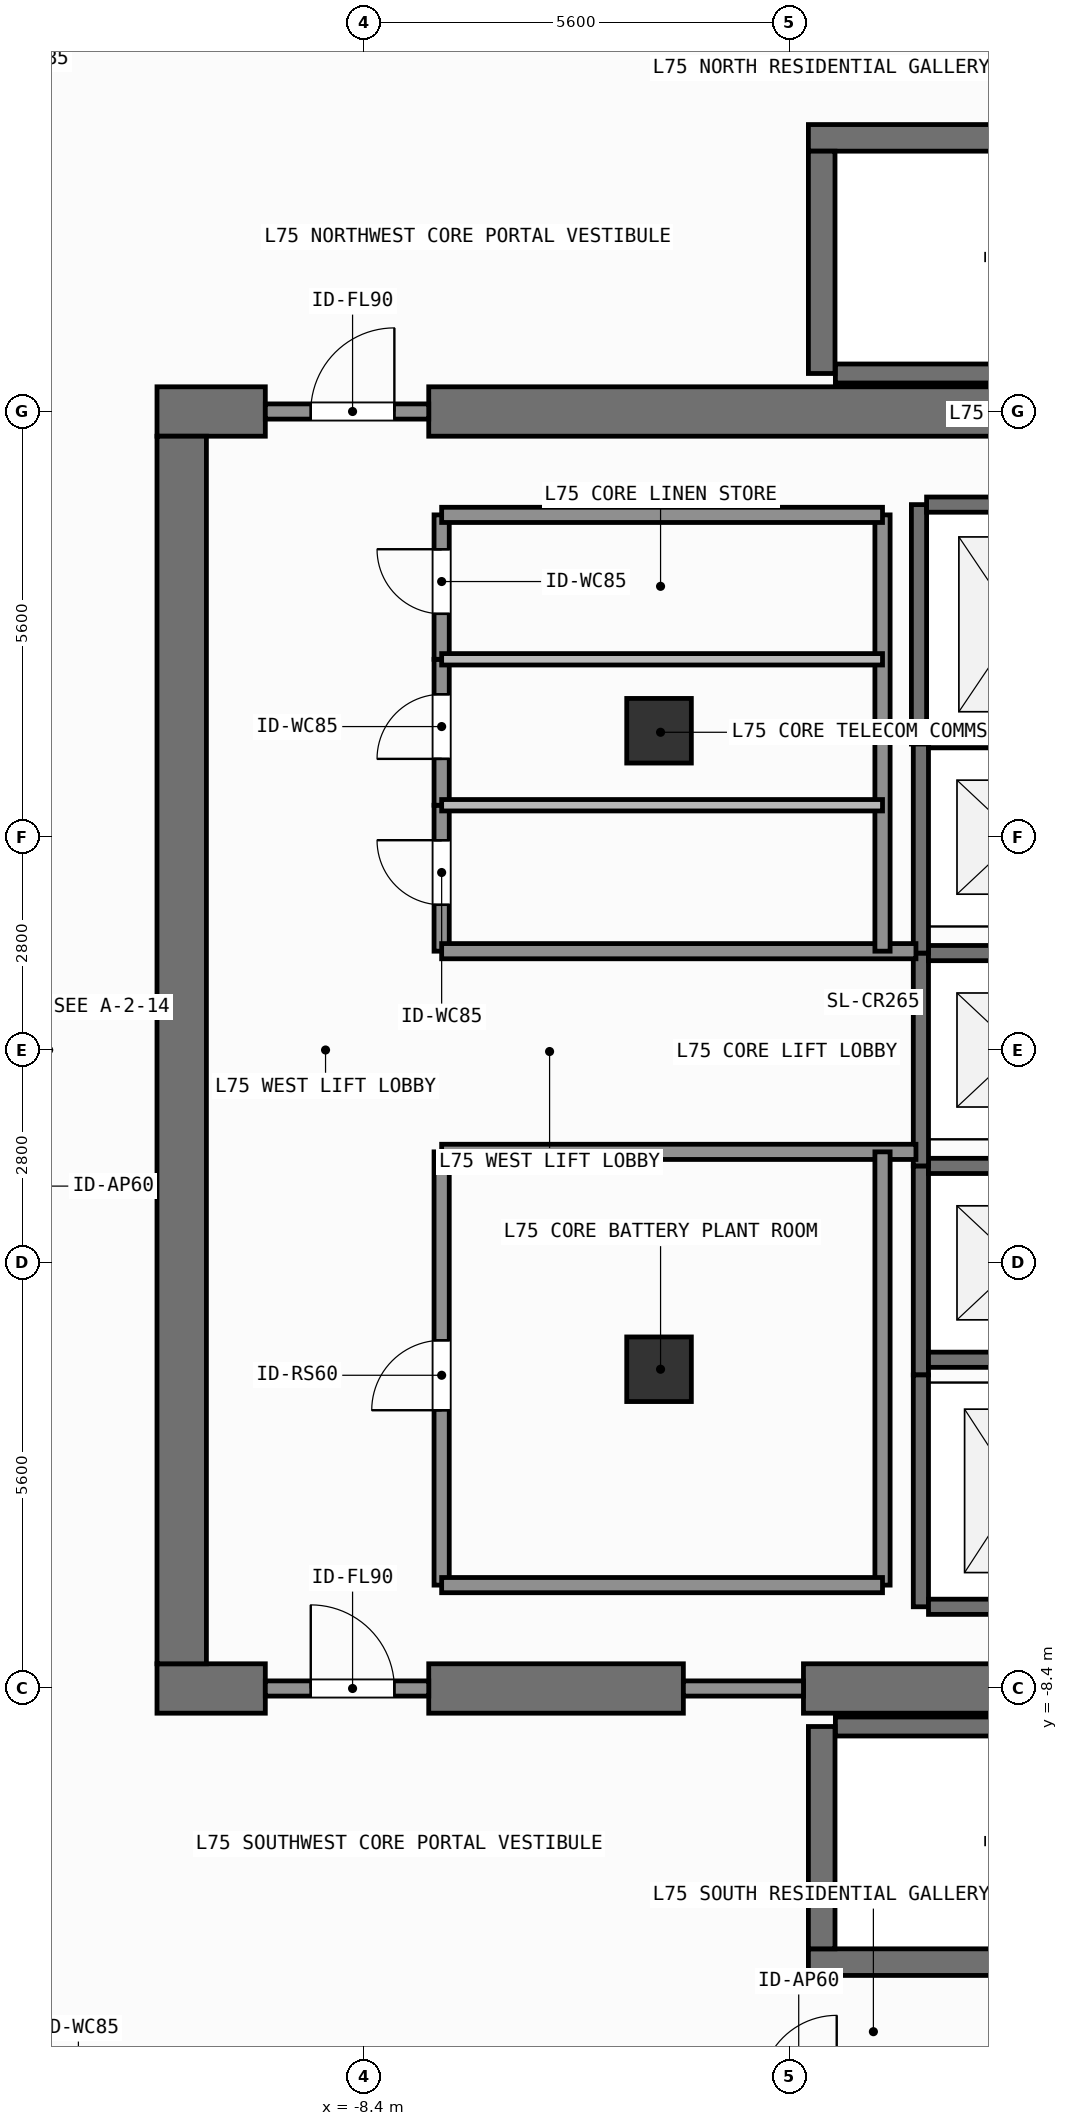
"""IFC4 building model, lengths in metres.
Left out: names, types, materials, properties, quantities, classifications, styles, units other than length and angle.
Written with IfcOpenShell. Run it as: python <this file> out.ifc"""

import sys

from ifc_helpers import new_model, si_unit, direction, frame, frame_2d, origin, origin_2d, place, context, subcontext, project, spatial, rectangle, extrude, element, fill, save


model = new_model("IFC4")
c1 = context("Model", 3, precision=1e-05, world=origin(), true_north=direction((0.0, 1.0)))
c2 = subcontext(c1, "Body", "Model", "MODEL_VIEW")
j1 = project(units=[si_unit("LENGTHUNIT", "METRE"), si_unit("PLANEANGLEUNIT", "RADIAN")], contexts=[c1])
p1 = place(None, origin())
s1 = spatial("IfcSite", under=j1, at=p1, CompositionType="ELEMENT")
p2 = place(p1, origin())
s2 = spatial("IfcBuilding", under=s1, at=p2, CompositionType="ELEMENT")
p3 = place(p2, frame((0.0, 0.0, 305.4)))
s3 = spatial("IfcBuildingStorey", under=s2, at=p3, CompositionType="ELEMENT", Elevation=305.4)
p4 = place(p3, frame((-11.125, -8.4, 0.0), z_axis=(0.0, 0.0, 1.0), x_axis=(1.0, 0.0, 0.0)))
e1 = element("IfcWall", 1, at=p4, inside=s3, PredefinedType="SHEAR", context=c2, shape_type="SweptSolid", body=[
    extrude(rectangle(XDim=1.425, YDim=0.65, at=frame_2d((0.712, 0.0))), origin(), (0.0, 0.0, 1.0), 3.9),
])
p5 = place(p3, frame((-7.55, -8.4, 0.0), z_axis=(0.0, 0.0, 1.0), x_axis=(1.0, 0.0, 0.0)))
e2 = element("IfcWall", 2, at=p5, inside=s3, PredefinedType="SHEAR", context=c2, shape_type="SweptSolid", body=[
    extrude(rectangle(XDim=3.35, YDim=0.65, at=frame_2d((1.675, 0.0))), origin(), (0.0, 0.0, 1.0), 3.9),
])
p6 = place(p3, frame((-2.62, -8.4, 0.0), z_axis=(0.0, 0.0, 1.0), x_axis=(1.0, 0.0, 0.0)))
e3 = element("IfcWall", 3, at=p6, inside=s3, PredefinedType="SHEAR", context=c2, shape_type="SweptSolid", body=[
    extrude(rectangle(XDim=7.27, YDim=0.65, at=frame_2d((3.635, 0.0))), origin(), (0.0, 0.0, 1.0), 3.9),
])
p7 = place(p3, frame((-11.125, 8.4, 0.0), z_axis=(0.0, 0.0, 1.0), x_axis=(1.0, 0.0, 0.0)))
e4 = element("IfcWall", 4, at=p7, inside=s3, PredefinedType="SHEAR", context=c2, shape_type="SweptSolid", body=[
    extrude(rectangle(XDim=1.425, YDim=0.65, at=frame_2d((0.712, 0.0))), origin(), (0.0, 0.0, 1.0), 3.9),
])
p8 = place(p3, frame((-7.55, 8.4, 0.0), z_axis=(0.0, 0.0, 1.0), x_axis=(1.0, 0.0, 0.0)))
e5 = element("IfcWall", 5, at=p8, inside=s3, PredefinedType="SHEAR", context=c2, shape_type="SweptSolid", body=[
    extrude(rectangle(XDim=16.275, YDim=0.65, at=frame_2d((8.138, 0.0))), origin(), (0.0, 0.0, 1.0), 3.9),
])
p9 = place(p3, frame((-10.8, -8.075, 0.0), z_axis=(0.0, 0.0, 1.0), x_axis=(0.0, 1.0, 0.0)))
e6 = element("IfcWall", 6, at=p9, inside=s3, PredefinedType="SHEAR", context=c2, shape_type="SweptSolid", body=[
    extrude(rectangle(XDim=16.15, YDim=0.65, at=frame_2d((8.075, 0.0))), origin(), (0.0, 0.0, 1.0), 3.9),
])
p10 = place(p3, frame((-2.555, -12.0, 0.0), z_axis=(0.0, 0.0, 1.0), x_axis=(1.0, 0.0, 0.0)))
e7 = element("IfcWall", 7, at=p10, inside=s3, PredefinedType="SHEAR", context=c2, shape_type="SweptSolid", body=[
    extrude(rectangle(XDim=7.31, YDim=0.35, at=frame_2d((3.655, 0.0))), origin(), (0.0, 0.0, 1.0), 3.9),
])
p11 = place(p3, frame((-2.2, -8.9, 0.0), z_axis=(0.0, 0.0, 1.0), x_axis=(1.0, 0.0, 0.0)))
e8 = element("IfcWall", 8, at=p11, inside=s3, PredefinedType="SHEAR", context=c2, shape_type="SweptSolid", body=[
    extrude(rectangle(XDim=6.6, YDim=0.25, at=frame_2d((3.3, 0.0))), origin(), (0.0, 0.0, 1.0), 3.9),
])
p12 = place(p3, frame((-2.38, -11.825, 0.0), z_axis=(0.0, 0.0, 1.0), x_axis=(0.0, 1.0, 0.0)))
e9 = element("IfcWall", 9, at=p12, inside=s3, PredefinedType="SHEAR", context=c2, shape_type="SweptSolid", body=[
    extrude(rectangle(XDim=2.925, YDim=0.35, at=frame_2d((1.462, 0.0))), origin(), (0.0, 0.0, 1.0), 3.9),
])
p13 = place(p3, frame((-2.555, 12.0, 0.0), z_axis=(0.0, 0.0, 1.0), x_axis=(1.0, 0.0, 0.0)))
e10 = element("IfcWall", 10, at=p13, inside=s3, PredefinedType="SHEAR", context=c2, shape_type="SweptSolid", body=[
    extrude(rectangle(XDim=7.31, YDim=0.35, at=frame_2d((3.655, 0.0))), origin(), (0.0, 0.0, 1.0), 3.9),
])
p14 = place(p3, frame((-2.2, 8.9, 0.0), z_axis=(0.0, 0.0, 1.0), x_axis=(1.0, 0.0, 0.0)))
e11 = element("IfcWall", 11, at=p14, inside=s3, PredefinedType="SHEAR", context=c2, shape_type="SweptSolid", body=[
    extrude(rectangle(XDim=6.6, YDim=0.25, at=frame_2d((3.3, 0.0))), origin(), (0.0, 0.0, 1.0), 3.9),
])
p15 = place(p3, frame((-2.38, 8.9, 0.0), z_axis=(0.0, 0.0, 1.0), x_axis=(0.0, 1.0, 0.0)))
e12 = element("IfcWall", 12, at=p15, inside=s3, PredefinedType="SHEAR", context=c2, shape_type="SweptSolid", body=[
    extrude(rectangle(XDim=2.925, YDim=0.35, at=frame_2d((1.462, 0.0))), origin(), (0.0, 0.0, 1.0), 3.9),
])
for number, where, z_axis, x_axis in (
    (13, (-4.52, -4.2, 0.0), (0.0, 0.0, 1.0), (1.0, 0.0, 0.0)),
    (14, (-4.52, 4.2, 0.0), (0.0, 0.0, 1.0), (1.0, 0.0, 0.0)),
):
    element("IfcColumn", number, at=place(p3, frame(where, z_axis=z_axis, x_axis=x_axis)), inside=s3, PredefinedType="COLUMN", context=c2, shape_type="SweptSolid", body=[
        extrude(rectangle(XDim=0.85, YDim=0.85, at=origin_2d()), origin(), (0.0, 0.0, 1.0), 3.9),
    ])
p16 = place(p3, frame((-1.075, -4.275, 0.0), z_axis=(0.0, 0.0, 1.0), x_axis=(0.0, 1.0, 0.0)))
e15 = element("IfcWall", 15, at=p16, inside=s3, PredefinedType="SHEAR", context=c2, shape_type="SweptSolid", body=[
    extrude(rectangle(XDim=2.75, YDim=0.2, at=frame_2d((1.375, 0.0))), origin(), (0.0, 0.0, 1.0), 3.68),
])
for number, where, z_axis, x_axis in (
    (16, (-0.975, -4.075, 0.0), (0.0, 0.0, 1.0), (1.0, 0.0, 0.0)),
    (17, (-0.975, -1.525, 0.0), (0.0, 0.0, 1.0), (1.0, 0.0, 0.0)),
):
    element("IfcWall", number, at=place(p3, frame(where, z_axis=z_axis, x_axis=x_axis)), inside=s3, PredefinedType="SHEAR", context=c2, shape_type="SweptSolid", body=[
        extrude(rectangle(XDim=2.35, YDim=0.2, at=frame_2d((1.175, 0.0))), origin(), (0.0, 0.0, 1.0), 3.68),
    ])
p17 = place(p3, frame((-1.075, -1.525, 0.0), z_axis=(0.0, 0.0, 1.0), x_axis=(0.0, 1.0, 0.0)))
e18 = element("IfcWall", 18, at=p17, inside=s3, PredefinedType="SHEAR", context=c2, shape_type="SweptSolid", body=[
    extrude(rectangle(XDim=2.8, YDim=0.2, at=frame_2d((1.4, 0.0))), origin(), (0.0, 0.0, 1.0), 3.68),
])
p18 = place(p3, frame((-0.975, 1.275, 0.0), z_axis=(0.0, 0.0, 1.0), x_axis=(1.0, 0.0, 0.0)))
e19 = element("IfcWall", 19, at=p18, inside=s3, PredefinedType="SHEAR", context=c2, shape_type="SweptSolid", body=[
    extrude(rectangle(XDim=2.35, YDim=0.2, at=frame_2d((1.175, 0.0))), origin(), (0.0, 0.0, 1.0), 3.68),
])
p19 = place(p3, frame((-1.075, 1.275, 0.0), z_axis=(0.0, 0.0, 1.0), x_axis=(0.0, 1.0, 0.0)))
e20 = element("IfcWall", 20, at=p19, inside=s3, PredefinedType="SHEAR", context=c2, shape_type="SweptSolid", body=[
    extrude(rectangle(XDim=2.8, YDim=0.2, at=frame_2d((1.4, 0.0))), origin(), (0.0, 0.0, 1.0), 3.68),
])
p20 = place(p3, frame((-0.975, 4.075, 0.0), z_axis=(0.0, 0.0, 1.0), x_axis=(1.0, 0.0, 0.0)))
e21 = element("IfcWall", 21, at=p20, inside=s3, PredefinedType="SHEAR", context=c2, shape_type="SweptSolid", body=[
    extrude(rectangle(XDim=2.35, YDim=0.2, at=frame_2d((1.175, 0.0))), origin(), (0.0, 0.0, 1.0), 3.68),
])
p21 = place(p3, frame((-1.1, 4.025, 0.0), z_axis=(0.0, 0.0, 1.0), x_axis=(0.0, 1.0, 0.0)))
e22 = element("IfcWall", 22, at=p21, inside=s3, PredefinedType="SHEAR", context=c2, shape_type="SweptSolid", body=[
    extrude(rectangle(XDim=3.15, YDim=0.2, at=frame_2d((1.575, 0.0))), origin(), (0.0, 0.0, 1.0), 3.68),
])
p22 = place(p3, frame((-1.0, 7.175, 0.0), z_axis=(0.0, 0.0, 1.0), x_axis=(1.0, 0.0, 0.0)))
e23 = element("IfcWall", 23, at=p22, inside=s3, PredefinedType="SHEAR", context=c2, shape_type="SweptSolid", body=[
    extrude(rectangle(XDim=2.4, YDim=0.2, at=frame_2d((1.2, 0.0))), origin(), (0.0, 0.0, 1.0), 3.68),
])
p23 = place(p3, frame((-1.075, -7.325, 0.0), z_axis=(0.0, 0.0, 1.0), x_axis=(0.0, 1.0, 0.0)))
e24 = element("IfcWall", 24, at=p23, inside=s3, PredefinedType="SHEAR", context=c2, shape_type="SweptSolid", body=[
    extrude(rectangle(XDim=3.05, YDim=0.2, at=frame_2d((1.525, 0.0))), origin(), (0.0, 0.0, 1.0), 3.68),
])
p24 = place(p3, frame((-0.975, -7.325, 0.0), z_axis=(0.0, 0.0, 1.0), x_axis=(1.0, 0.0, 0.0)))
e25 = element("IfcWall", 25, at=p24, inside=s3, PredefinedType="SHEAR", context=c2, shape_type="SweptSolid", body=[
    extrude(rectangle(XDim=2.35, YDim=0.2, at=frame_2d((1.175, 0.0))), origin(), (0.0, 0.0, 1.0), 3.68),
])
p25 = place(p3, frame((-9.7, -8.4, 0.0), z_axis=(0.0, 0.0, 1.0), x_axis=(1.0, 0.0, 0.0)))
e26 = element("IfcWall", 26, at=p25, inside=s3, PredefinedType="SOLIDWALL", context=c2, shape_type="SweptSolid", body=[
    extrude(rectangle(XDim=2.15, YDim=0.2, at=frame_2d((1.075, 0.0))), origin(), (0.0, 0.0, 1.0), 2.92),
])
p26 = place(p25, frame((0.598, 0.0, 0.0)))
e27 = element("IfcOpeningElement", 27, at=p26, cuts=e26, PredefinedType="OPENING", context=c2, shape_type="SweptSolid", body=[
    extrude(rectangle(XDim=1.1, YDim=2.15, at=frame_2d((0.55, 1.075))), frame((0.0, 0.11, 0.0), z_axis=(0.0, -1.0, 0.0), x_axis=(1.0, 0.0, 0.0)), (0.0, 0.0, 1.0), 0.22),
])
p27 = place(p3, frame((-9.7, 8.4, 0.0), z_axis=(0.0, 0.0, 1.0), x_axis=(1.0, 0.0, 0.0)))
e28 = element("IfcWall", 28, at=p27, inside=s3, PredefinedType="SOLIDWALL", context=c2, shape_type="SweptSolid", body=[
    extrude(rectangle(XDim=2.15, YDim=0.2, at=frame_2d((1.075, 0.0))), origin(), (0.0, 0.0, 1.0), 2.92),
])
p28 = place(p27, frame((0.598, 0.0, 0.0)))
e29 = element("IfcOpeningElement", 29, at=p28, cuts=e28, PredefinedType="OPENING", context=c2, shape_type="SweptSolid", body=[
    extrude(rectangle(XDim=1.1, YDim=2.15, at=frame_2d((0.55, 1.075))), frame((0.0, 0.11, 0.0), z_axis=(0.0, -1.0, 0.0), x_axis=(1.0, 0.0, 0.0)), (0.0, 0.0, 1.0), 0.22),
])
p29 = place(p3, frame((-7.38, -7.04, 0.0), z_axis=(0.0, 0.0, 1.0), x_axis=(0.0, 1.0, 0.0)))
e30 = element("IfcWall", 30, at=p29, inside=s3, PredefinedType="SOLIDWALL", context=c2, shape_type="SweptSolid", body=[
    extrude(rectangle(XDim=5.7, YDim=0.2, at=frame_2d((2.85, 0.0))), origin(), (0.0, 0.0, 1.0), 3.68),
])
p30 = place(p29, frame((2.301, 0.0, 0.0)))
e31 = element("IfcOpeningElement", 31, at=p30, cuts=e30, PredefinedType="OPENING", context=c2, shape_type="SweptSolid", body=[
    extrude(rectangle(XDim=0.92, YDim=2.1, at=frame_2d((0.46, 1.05))), frame((0.0, 0.11, 0.0), z_axis=(0.0, -1.0, 0.0), x_axis=(1.0, 0.0, 0.0)), (0.0, 0.0, 1.0), 0.22),
])
p31 = place(p3, frame((-7.38, 1.3, 0.0), z_axis=(0.0, 0.0, 1.0), x_axis=(0.0, 1.0, 0.0)))
e32 = element("IfcWall", 32, at=p31, inside=s3, PredefinedType="SOLIDWALL", context=c2, shape_type="SweptSolid", body=[
    extrude(rectangle(XDim=1.92, YDim=0.2, at=frame_2d((0.96, 0.0))), origin(), (0.0, 0.0, 1.0), 3.68),
])
p32 = place(p31, frame((0.61, 0.0, 0.0)))
e33 = element("IfcOpeningElement", 33, at=p32, cuts=e32, PredefinedType="OPENING", context=c2, shape_type="SweptSolid", body=[
    extrude(rectangle(XDim=0.85, YDim=2.1, at=frame_2d((0.425, 1.05))), frame((0.0, 0.11, 0.0), z_axis=(0.0, -1.0, 0.0), x_axis=(1.0, 0.0, 0.0)), (0.0, 0.0, 1.0), 0.22),
])
p33 = place(p3, frame((-7.38, 3.22, 0.0), z_axis=(0.0, 0.0, 1.0), x_axis=(0.0, 1.0, 0.0)))
e34 = element("IfcWall", 34, at=p33, inside=s3, PredefinedType="SOLIDWALL", context=c2, shape_type="SweptSolid", body=[
    extrude(rectangle(XDim=1.92, YDim=0.2, at=frame_2d((0.96, 0.0))), origin(), (0.0, 0.0, 1.0), 3.68),
])
p34 = place(p33, frame((0.61, 0.0, 0.0)))
e35 = element("IfcOpeningElement", 35, at=p34, cuts=e34, PredefinedType="OPENING", context=c2, shape_type="SweptSolid", body=[
    extrude(rectangle(XDim=0.85, YDim=2.1, at=frame_2d((0.425, 1.05))), frame((0.0, 0.11, 0.0), z_axis=(0.0, -1.0, 0.0), x_axis=(1.0, 0.0, 0.0)), (0.0, 0.0, 1.0), 0.22),
])
p35 = place(p3, frame((-7.38, 5.14, 0.0), z_axis=(0.0, 0.0, 1.0), x_axis=(0.0, 1.0, 0.0)))
e36 = element("IfcWall", 36, at=p35, inside=s3, PredefinedType="SOLIDWALL", context=c2, shape_type="SweptSolid", body=[
    extrude(rectangle(XDim=1.9, YDim=0.2, at=frame_2d((0.95, 0.0))), origin(), (0.0, 0.0, 1.0), 3.68),
])
p36 = place(p35, frame((0.598, 0.0, 0.0)))
e37 = element("IfcOpeningElement", 37, at=p36, cuts=e36, PredefinedType="OPENING", context=c2, shape_type="SweptSolid", body=[
    extrude(rectangle(XDim=0.85, YDim=2.1, at=frame_2d((0.425, 1.05))), frame((0.0, 0.11, 0.0), z_axis=(0.0, -1.0, 0.0), x_axis=(1.0, 0.0, 0.0)), (0.0, 0.0, 1.0), 0.22),
])
p37 = place(p3, frame((-4.2, -8.4, 0.0), z_axis=(0.0, 0.0, 1.0), x_axis=(1.0, 0.0, 0.0)))
e38 = element("IfcWall", 38, at=p37, inside=s3, PredefinedType="SOLIDWALL", context=c2, shape_type="SweptSolid", body=[
    extrude(rectangle(XDim=1.58, YDim=0.2, at=frame_2d((0.79, 0.0))), origin(), (0.0, 0.0, 1.0), 2.92),
])
for number, where, z_axis, x_axis in (
    (39, (-7.38, -1.34, 0.0), (0.0, 0.0, 1.0), (1.0, 0.0, 0.0)),
    (40, (-7.38, 1.3, 0.0), (0.0, 0.0, 1.0), (1.0, 0.0, 0.0)),
):
    element("IfcWall", number, at=place(p3, frame(where, z_axis=z_axis, x_axis=x_axis)), inside=s3, PredefinedType="SOLIDWALL", context=c2, shape_type="SweptSolid", body=[
        extrude(rectangle(XDim=6.24, YDim=0.2, at=frame_2d((3.12, 0.0))), origin(), (0.0, 0.0, 1.0), 3.68),
    ])
p38 = place(p3, frame((-1.58, -7.04, 0.0), z_axis=(0.0, 0.0, 1.0), x_axis=(0.0, 1.0, 0.0)))
e41 = element("IfcWall", 41, at=p38, inside=s3, PredefinedType="SOLIDWALL", context=c2, shape_type="SweptSolid", body=[
    extrude(rectangle(XDim=5.7, YDim=0.2, at=frame_2d((2.85, 0.0))), origin(), (0.0, 0.0, 1.0), 3.68),
])
p39 = place(p3, frame((-7.38, -7.04, 0.0), z_axis=(0.0, 0.0, 1.0), x_axis=(1.0, 0.0, 0.0)))
e42 = element("IfcWall", 42, at=p39, inside=s3, PredefinedType="SOLIDWALL", context=c2, shape_type="SweptSolid", body=[
    extrude(rectangle(XDim=5.8, YDim=0.2, at=frame_2d((2.9, 0.0))), origin(), (0.0, 0.0, 1.0), 3.68),
])
p40 = place(p3, frame((-1.58, 1.3, 0.0), z_axis=(0.0, 0.0, 1.0), x_axis=(0.0, 1.0, 0.0)))
e43 = element("IfcWall", 43, at=p40, inside=s3, PredefinedType="SOLIDWALL", context=c2, shape_type="SweptSolid", body=[
    extrude(rectangle(XDim=5.74, YDim=0.2, at=frame_2d((2.87, 0.0))), origin(), (0.0, 0.0, 1.0), 3.68),
])
p41 = place(p3, frame((-7.38, 7.04, 0.0), z_axis=(0.0, 0.0, 1.0), x_axis=(1.0, 0.0, 0.0)))
e44 = element("IfcWall", 44, at=p41, inside=s3, PredefinedType="SOLIDWALL", context=c2, shape_type="SweptSolid", body=[
    extrude(rectangle(XDim=5.8, YDim=0.2, at=frame_2d((2.9, 0.0))), origin(), (0.0, 0.0, 1.0), 3.68),
])
for number, where, z_axis, x_axis in (
    (45, (-7.38, 3.22, 0.0), (0.0, 0.0, 1.0), (1.0, 0.0, 0.0)),
    (46, (-7.38, 5.14, 0.0), (0.0, 0.0, 1.0), (1.0, 0.0, 0.0)),
):
    element("IfcWall", number, at=place(p3, frame(where, z_axis=z_axis, x_axis=x_axis)), inside=s3, PredefinedType="PARTITIONING", context=c2, shape_type="SweptSolid", body=[
        extrude(rectangle(XDim=5.8, YDim=0.15, at=frame_2d((2.9, 0.0))), origin(), (0.0, 0.0, 1.0), 3.68),
    ])
p42 = place(p26, origin())
e47 = element("IfcDoor", 47, at=p42, inside=s3, OperationType="SINGLE_SWING_LEFT", PredefinedType="DOOR", context=c2, shape_type="SweptSolid", body=[
    extrude(rectangle(XDim=1.1, YDim=2.15, at=frame_2d((0.55, 1.075))), frame((0.0, 0.025, 0.0), z_axis=(0.0, -1.0, 0.0), x_axis=(1.0, 0.0, 0.0)), (0.0, 0.0, 1.0), 0.05),
])
fill(e27, e47)
p43 = place(p28, origin())
e48 = element("IfcDoor", 48, at=p43, inside=s3, OperationType="SINGLE_SWING_RIGHT", PredefinedType="DOOR", context=c2, shape_type="SweptSolid", body=[
    extrude(rectangle(XDim=1.1, YDim=2.15, at=frame_2d((0.55, 1.075))), frame((0.0, 0.025, 0.0), z_axis=(0.0, -1.0, 0.0), x_axis=(1.0, 0.0, 0.0)), (0.0, 0.0, 1.0), 0.05),
])
fill(e29, e48)
p44 = place(p30, origin())
e49 = element("IfcDoor", 49, at=p44, inside=s3, OperationType="SINGLE_SWING_LEFT", PredefinedType="DOOR", context=c2, shape_type="SweptSolid", body=[
    extrude(rectangle(XDim=0.92, YDim=2.1, at=frame_2d((0.46, 1.05))), frame((0.0, 0.025, 0.0), z_axis=(0.0, -1.0, 0.0), x_axis=(1.0, 0.0, 0.0)), (0.0, 0.0, 1.0), 0.05),
])
fill(e31, e49)
p45 = place(p32, origin())
e50 = element("IfcDoor", 50, at=p45, inside=s3, OperationType="SINGLE_SWING_RIGHT", PredefinedType="DOOR", context=c2, shape_type="SweptSolid", body=[
    extrude(rectangle(XDim=0.85, YDim=2.1, at=frame_2d((0.425, 1.05))), frame((0.0, 0.025, 0.0), z_axis=(0.0, -1.0, 0.0), x_axis=(1.0, 0.0, 0.0)), (0.0, 0.0, 1.0), 0.05),
])
fill(e33, e50)
p46 = place(p34, origin())
e51 = element("IfcDoor", 51, at=p46, inside=s3, OperationType="SINGLE_SWING_LEFT", PredefinedType="DOOR", context=c2, shape_type="SweptSolid", body=[
    extrude(rectangle(XDim=0.85, YDim=2.1, at=frame_2d((0.425, 1.05))), frame((0.0, 0.025, 0.0), z_axis=(0.0, -1.0, 0.0), x_axis=(1.0, 0.0, 0.0)), (0.0, 0.0, 1.0), 0.05),
])
fill(e35, e51)
p47 = place(p36, origin())
e52 = element("IfcDoor", 52, at=p47, inside=s3, OperationType="SINGLE_SWING_RIGHT", PredefinedType="DOOR", context=c2, shape_type="SweptSolid", body=[
    extrude(rectangle(XDim=0.85, YDim=2.1, at=frame_2d((0.425, 1.05))), frame((0.0, 0.025, 0.0), z_axis=(0.0, -1.0, 0.0), x_axis=(1.0, 0.0, 0.0)), (0.0, 0.0, 1.0), 0.05),
])
fill(e37, e52)
save(model, sys.argv[1])
